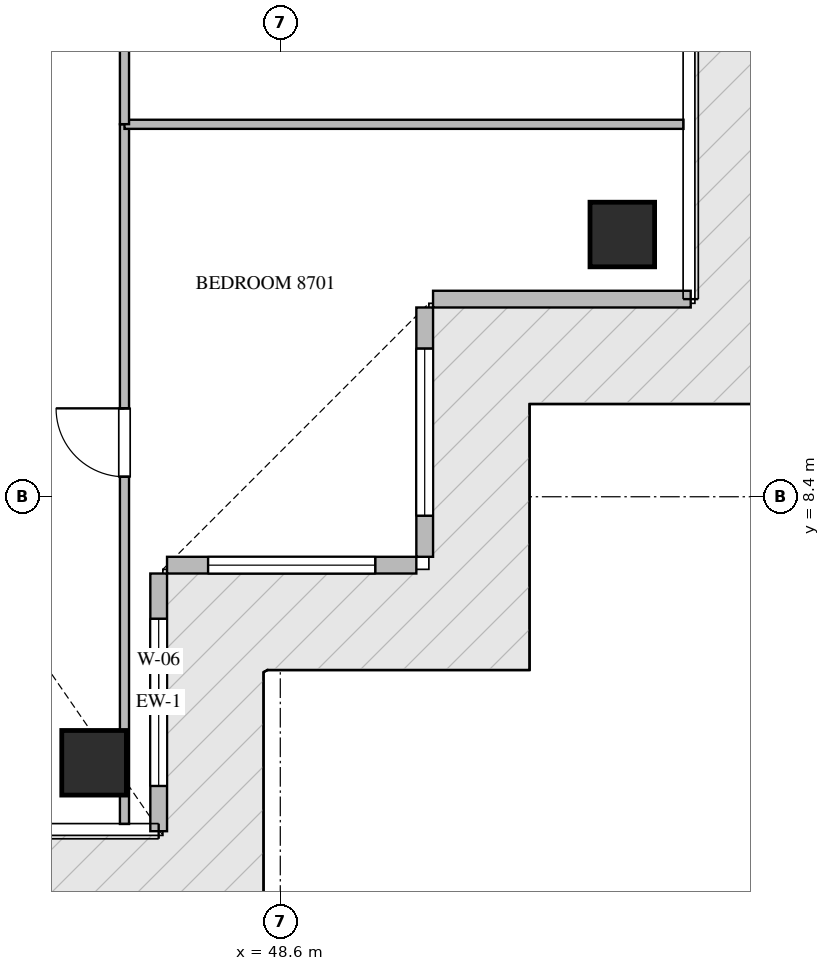
"""IFC4 building model, lengths in metres.
Left out: names, types, materials, properties, quantities, classifications, styles, units other than length and angle.
Written with IfcOpenShell. Run it as: python <this file> out.ifc"""

import sys

from ifc_helpers import new_model, si_unit, direction, frame, frame_2d, origin, origin_2d, place, context, subcontext, project, spatial, rectangle, extrude, source, transform, mapped, element, fill, save


model = new_model("IFC4")
c1 = context("Model", 3, precision=1e-05, world=origin(), true_north=direction((0.0, 1.0)))
c2 = subcontext(c1, "Body", "Model", "MODEL_VIEW")
j1 = project(units=[si_unit("LENGTHUNIT", "METRE"), si_unit("PLANEANGLEUNIT", "RADIAN")], contexts=[c1])
p1 = place(None, origin())
s1 = spatial("IfcSite", under=j1, at=p1, CompositionType="ELEMENT")
p2 = place(p1, origin())
s2 = spatial("IfcBuilding", under=s1, at=p2, CompositionType="ELEMENT")
p3 = place(p2, frame((0.0, 0.0, 353.85)))
s3 = spatial("IfcBuildingStorey", under=s2, at=p3, CompositionType="ELEMENT", Elevation=353.85)
m1 = source(origin(), c2, "Body", "SweptSolid", [
    extrude(rectangle(XDim=0.85, YDim=0.85, at=origin_2d()), origin(), (0.0, 0.0, 1.0), 5.8),
])
for number, where, z_axis, x_axis in (
    (1, (46.15, 4.9, -0.26), (0.0, 0.0, 1.0), (1.0, 0.0, 0.0)),
    (2, (53.1, 11.85, -0.26), (0.0, 0.0, 1.0), (1.0, 0.0, 0.0)),
):
    element("IfcColumn", number, at=place(p3, frame(where, z_axis=z_axis, x_axis=x_axis)), inside=s3, PredefinedType="COLUMN", context=c2, shape_type="MappedRepresentation", body=[
        mapped(m1, transform((0.0, 0.0, 0.0), scale=1.0)),
    ])
p4 = place(p3, frame((47.0, 4.0, 0.0), z_axis=(0.0, 0.0, 1.0), x_axis=(0.0, 1.0, 0.0)))
e3 = element("IfcWall", 3, at=p4, inside=s3, PredefinedType="ELEMENTEDWALL", context=c2, shape_type="SweptSolid", body=[
    extrude(rectangle(XDim=3.39, YDim=0.22, at=frame_2d((1.695, 0.0))), origin(), (0.0, 0.0, 1.0), 5.525),
])
p5 = place(p4, frame((0.595, 0.0, 0.65)))
e4 = element("IfcOpeningElement", 4, at=p5, cuts=e3, PredefinedType="OPENING", context=c2, shape_type="SweptSolid", body=[
    extrude(rectangle(XDim=2.2, YDim=2.4, at=frame_2d((1.1, 1.2))), frame((0.0, 0.12, 0.0), z_axis=(0.0, -1.0, 0.0), x_axis=(1.0, 0.0, 0.0)), (0.0, 0.0, 1.0), 0.24),
])
p6 = place(p3, frame((47.11, 7.5, 0.0), z_axis=(0.0, 0.0, 1.0), x_axis=(1.0, 0.0, 0.0)))
e5 = element("IfcWall", 5, at=p6, inside=s3, PredefinedType="ELEMENTEDWALL", context=c2, shape_type="SweptSolid", body=[
    extrude(rectangle(XDim=3.28, YDim=0.22, at=frame_2d((1.64, 0.0))), origin(), (0.0, 0.0, 1.0), 5.525),
])
p7 = place(p6, frame((0.54, 0.0, 0.65)))
e6 = element("IfcOpeningElement", 6, at=p7, cuts=e5, PredefinedType="OPENING", context=c2, shape_type="SweptSolid", body=[
    extrude(rectangle(XDim=2.2, YDim=2.4, at=frame_2d((1.1, 1.2))), frame((0.0, 0.12, 0.0), z_axis=(0.0, -1.0, 0.0), x_axis=(1.0, 0.0, 0.0)), (0.0, 0.0, 1.0), 0.24),
])
p8 = place(p3, frame((50.5, 7.61, 0.0), z_axis=(0.0, 0.0, 1.0), x_axis=(0.0, 1.0, 0.0)))
e7 = element("IfcWall", 7, at=p8, inside=s3, PredefinedType="ELEMENTEDWALL", context=c2, shape_type="SweptSolid", body=[
    extrude(rectangle(XDim=3.28, YDim=0.22, at=frame_2d((1.64, 0.0))), origin(), (0.0, 0.0, 1.0), 5.525),
])
p9 = place(p8, frame((0.54, 0.0, 0.65)))
e8 = element("IfcOpeningElement", 8, at=p9, cuts=e7, PredefinedType="OPENING", context=c2, shape_type="SweptSolid", body=[
    extrude(rectangle(XDim=2.2, YDim=2.4, at=frame_2d((1.1, 1.2))), frame((0.0, 0.12, 0.0), z_axis=(0.0, -1.0, 0.0), x_axis=(1.0, 0.0, 0.0)), (0.0, 0.0, 1.0), 0.24),
])
p10 = place(p3, frame((50.61, 11.0, 0.0), z_axis=(0.0, 0.0, 1.0), x_axis=(1.0, 0.0, 0.0)))
e9 = element("IfcWall", 9, at=p10, inside=s3, PredefinedType="ELEMENTEDWALL", context=c2, shape_type="SweptSolid", body=[
    extrude(rectangle(XDim=3.39, YDim=0.22, at=frame_2d((1.695, 0.0))), origin(), (0.0, 0.0, 1.0), 5.525),
])
p11 = place(p3, frame((46.55, 4.095, 0.0), z_axis=(0.0, 0.0, 1.0), x_axis=(0.0, 1.0, 0.0)))
e10 = element("IfcWall", 10, at=p11, inside=s3, PredefinedType="PARTITIONING", context=c2, shape_type="SweptSolid", body=[
    extrude(rectangle(XDim=9.205, YDim=0.12, at=frame_2d((4.603, 0.0))), origin(), (0.0, 0.0, 1.0), 5.54),
])
p12 = place(p11, frame((4.568, 0.0, 0.0)))
e11 = element("IfcOpeningElement", 11, at=p12, cuts=e10, PredefinedType="OPENING", context=c2, shape_type="SweptSolid", body=[
    extrude(rectangle(XDim=0.9, YDim=2.1, at=frame_2d((0.45, 1.05))), frame((0.0, 0.07, 0.0), z_axis=(0.0, -1.0, 0.0), x_axis=(1.0, 0.0, 0.0)), (0.0, 0.0, 1.0), 0.14),
])
p13 = place(p3, frame((46.55, 13.3, 0.0), z_axis=(0.0, 0.0, 1.0), x_axis=(1.0, 0.0, 0.0)))
e12 = element("IfcWall", 12, at=p13, inside=s3, PredefinedType="PARTITIONING", context=c2, shape_type="SweptSolid", body=[
    extrude(rectangle(XDim=7.355, YDim=0.12, at=frame_2d((3.677, 0.0))), origin(), (0.0, 0.0, 1.0), 5.54),
])
p14 = place(p3, frame((46.55, 13.302, 0.0), z_axis=(0.0, 0.0, 1.0), x_axis=(0.0, 1.0, 0.0)))
e13 = element("IfcWall", 13, at=p14, inside=s3, PredefinedType="PARTITIONING", context=c2, shape_type="SweptSolid", body=[
    extrude(rectangle(XDim=3.558, YDim=0.12, at=frame_2d((1.779, 0.0))), origin(), (0.0, 0.0, 1.0), 5.54),
])
p15 = place(p14, frame((1.354, 0.0, 0.0)))
e14 = element("IfcOpeningElement", 14, at=p15, cuts=e13, PredefinedType="OPENING", context=c2, shape_type="SweptSolid", body=[
    extrude(rectangle(XDim=0.85, YDim=2.1, at=frame_2d((0.425, 1.05))), frame((0.0, 0.07, 0.0), z_axis=(0.0, -1.0, 0.0), x_axis=(1.0, 0.0, 0.0)), (0.0, 0.0, 1.0), 0.14),
])
m2 = source(origin(), c2, "Body", "SweptSolid", [
    extrude(rectangle(XDim=2.2, YDim=2.4, at=frame_2d((1.1, 1.2))), frame((0.0, 0.03, 0.0), z_axis=(0.0, -1.0, 0.0), x_axis=(1.0, 0.0, 0.0)), (0.0, 0.0, 1.0), 0.06),
])
p16 = place(p5, origin())
e15 = element("IfcWindow", 15, at=p16, inside=s3, PartitioningType="SINGLE_PANEL", PredefinedType="WINDOW", context=c2, shape_type="MappedRepresentation", body=[
    mapped(m2, transform((0.0, 0.0, 0.0), scale=1.0)),
])
fill(e4, e15)
p17 = place(p7, origin())
e16 = element("IfcWindow", 16, at=p17, inside=s3, PartitioningType="SINGLE_PANEL", PredefinedType="WINDOW", context=c2, shape_type="MappedRepresentation", body=[
    mapped(m2, transform((0.0, 0.0, 0.0), scale=1.0)),
])
fill(e6, e16)
p18 = place(p9, origin())
e17 = element("IfcWindow", 17, at=p18, inside=s3, PartitioningType="SINGLE_PANEL", PredefinedType="WINDOW", context=c2, shape_type="MappedRepresentation", body=[
    mapped(m2, transform((0.0, 0.0, 0.0), scale=1.0)),
])
fill(e8, e17)
m3 = source(origin(), c2, "Body", "SweptSolid", [
    extrude(rectangle(XDim=0.9, YDim=2.1, at=frame_2d((0.45, 1.05))), frame((0.0, 0.025, 0.0), z_axis=(0.0, -1.0, 0.0), x_axis=(1.0, 0.0, 0.0)), (0.0, 0.0, 1.0), 0.05),
])
p19 = place(p12, origin())
e18 = element("IfcDoor", 18, at=p19, inside=s3, OperationType="SINGLE_SWING_RIGHT", PredefinedType="DOOR", context=c2, shape_type="MappedRepresentation", body=[
    mapped(m3, transform((0.0, 0.0, 0.0), scale=1.0)),
])
fill(e11, e18)
save(model, sys.argv[1])
